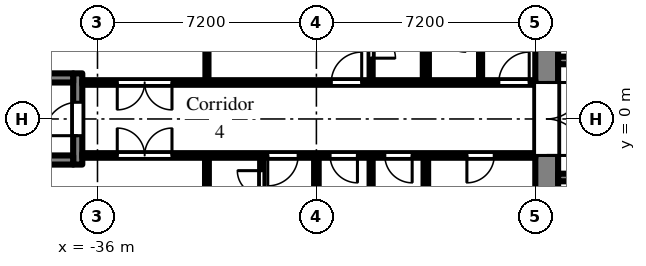
"""IFC4 building model, lengths in metres.
Left out: names, types, materials, properties, quantities, classifications, styles, units other than length and angle.
Written with IfcOpenShell. Run it as: python <this file> out.ifc"""

import sys

from ifc_helpers import new_model, si_unit, direction, frame, frame_2d, origin, place, context, subcontext, project, spatial, rectangle, extrude, element, fill, save


model = new_model("IFC4")
c1 = context("Model", 3, precision=1e-05, world=origin(), true_north=direction((0.0, 1.0)))
c2 = subcontext(c1, "Body", "Model", "MODEL_VIEW")
j1 = project(units=[si_unit("LENGTHUNIT", "METRE"), si_unit("PLANEANGLEUNIT", "RADIAN")], contexts=[c1])
p1 = place(None, origin())
s1 = spatial("IfcSite", under=j1, at=p1, CompositionType="ELEMENT")
p2 = place(p1, origin())
s2 = spatial("IfcBuilding", under=s1, at=p2, CompositionType="ELEMENT")
p3 = place(p2, frame((0.0, 0.0, 66.9)))
s3 = spatial("IfcBuildingStorey", under=s2, at=p3, CompositionType="ELEMENT", Elevation=66.9)
p4 = place(p3, frame((-21.225, -7.2, 0.0), z_axis=(0.0, 0.0, 1.0), x_axis=(0.0, 1.0, 0.0)))
e1 = element("IfcWall", 1, at=p4, inside=s3, PredefinedType="SHEAR", context=c2, shape_type="SweptSolid", body=[
    extrude(rectangle(XDim=14.4, YDim=0.75, at=frame_2d((7.2, 0.0))), origin(), (0.0, 0.0, 1.0), 2.575),
])
p5 = place(p4, frame((6.0, 0.0, 0.0)))
e2 = element("IfcOpeningElement", 2, at=p5, cuts=e1, PredefinedType="OPENING", context=c2, shape_type="SweptSolid", body=[
    extrude(rectangle(XDim=2.4, YDim=2.2, at=frame_2d((1.2, 1.1))), frame((0.0, 0.385, 0.0), z_axis=(0.0, -1.0, 0.0), x_axis=(1.0, 0.0, 0.0)), (0.0, 0.0, 1.0), 0.77),
])
p6 = place(p3, frame((-7.9, 1.925, 0.0), z_axis=(0.0, 0.0, 1.0), x_axis=(-1.0, 0.0, 0.0)))
e3 = element("IfcWall", 3, at=p6, inside=s3, PredefinedType="SHEAR", context=c2, shape_type="SweptSolid", body=[
    extrude(rectangle(XDim=12.95, YDim=0.25, at=frame_2d((6.475, 0.0))), origin(), (0.0, 0.0, 1.0), 2.575),
])
p7 = place(p6, frame((0.525, 0.0, 0.0)))
e4 = element("IfcOpeningElement", 4, at=p7, cuts=e3, PredefinedType="OPENING", context=c2, shape_type="SweptSolid", body=[
    extrude(rectangle(XDim=0.9, YDim=2.1, at=frame_2d((0.45, 1.05))), frame((0.0, 0.135, 0.0), z_axis=(0.0, -1.0, 0.0), x_axis=(1.0, 0.0, 0.0)), (0.0, 0.0, 1.0), 0.27),
])
p8 = place(p6, frame((2.625, 0.0, 0.0)))
e5 = element("IfcOpeningElement", 5, at=p8, cuts=e3, PredefinedType="OPENING", context=c2, shape_type="SweptSolid", body=[
    extrude(rectangle(XDim=1.1, YDim=2.1, at=frame_2d((0.55, 1.05))), frame((0.0, 0.135, 0.0), z_axis=(0.0, -1.0, 0.0), x_axis=(1.0, 0.0, 0.0)), (0.0, 0.0, 1.0), 0.27),
])
p9 = place(p6, frame((7.125, 0.0, 0.0)))
e6 = element("IfcOpeningElement", 6, at=p9, cuts=e3, PredefinedType="OPENING", context=c2, shape_type="SweptSolid", body=[
    extrude(rectangle(XDim=0.9, YDim=2.1, at=frame_2d((0.45, 1.05))), frame((0.0, 0.135, 0.0), z_axis=(0.0, -1.0, 0.0), x_axis=(1.0, 0.0, 0.0)), (0.0, 0.0, 1.0), 0.27),
])
p10 = place(p3, frame((-7.9, -1.925, 0.0), z_axis=(0.0, 0.0, 1.0), x_axis=(-1.0, 0.0, 0.0)))
e7 = element("IfcWall", 7, at=p10, inside=s3, PredefinedType="SHEAR", context=c2, shape_type="SweptSolid", body=[
    extrude(rectangle(XDim=12.95, YDim=0.25, at=frame_2d((6.475, 0.0))), origin(), (0.0, 0.0, 1.0), 2.575),
])
p11 = place(p10, frame((4.825, 0.0, 0.0)))
e8 = element("IfcOpeningElement", 8, at=p11, cuts=e7, PredefinedType="OPENING", context=c2, shape_type="SweptSolid", body=[
    extrude(rectangle(XDim=1.1, YDim=2.1, at=frame_2d((0.55, 1.05))), frame((0.0, 0.135, 0.0), z_axis=(0.0, -1.0, 0.0), x_axis=(1.0, 0.0, 0.0)), (0.0, 0.0, 1.0), 0.27),
])
p12 = place(p10, frame((7.025, 0.0, 0.0)))
e9 = element("IfcOpeningElement", 9, at=p12, cuts=e7, PredefinedType="OPENING", context=c2, shape_type="SweptSolid", body=[
    extrude(rectangle(XDim=1.1, YDim=2.1, at=frame_2d((0.55, 1.05))), frame((0.0, 0.135, 0.0), z_axis=(0.0, -1.0, 0.0), x_axis=(1.0, 0.0, 0.0)), (0.0, 0.0, 1.0), 0.27),
])
p13 = place(p10, frame((9.225, 0.0, 0.0)))
e10 = element("IfcOpeningElement", 10, at=p13, cuts=e7, PredefinedType="OPENING", context=c2, shape_type="SweptSolid", body=[
    extrude(rectangle(XDim=1.1, YDim=2.1, at=frame_2d((0.55, 1.05))), frame((0.0, 0.135, 0.0), z_axis=(0.0, -1.0, 0.0), x_axis=(1.0, 0.0, 0.0)), (0.0, 0.0, 1.0), 0.27),
])
p14 = place(p10, frame((0.525, 0.0, 0.0)))
e11 = element("IfcOpeningElement", 11, at=p14, cuts=e7, PredefinedType="OPENING", context=c2, shape_type="SweptSolid", body=[
    extrude(rectangle(XDim=0.9, YDim=2.1, at=frame_2d((0.45, 1.05))), frame((0.0, 0.135, 0.0), z_axis=(0.0, -1.0, 0.0), x_axis=(1.0, 0.0, 0.0)), (0.0, 0.0, 1.0), 0.27),
])
p15 = place(p10, frame((2.625, 0.0, 0.0)))
e12 = element("IfcOpeningElement", 12, at=p15, cuts=e7, PredefinedType="OPENING", context=c2, shape_type="SweptSolid", body=[
    extrude(rectangle(XDim=1.1, YDim=2.1, at=frame_2d((0.55, 1.05))), frame((0.0, 0.135, 0.0), z_axis=(0.0, -1.0, 0.0), x_axis=(1.0, 0.0, 0.0)), (0.0, 0.0, 1.0), 0.27),
])
p16 = place(p3, frame((-36.65, -1.5, 0.0), z_axis=(0.0, 0.0, 1.0), x_axis=(0.0, 1.0, 0.0)))
e13 = element("IfcWall", 13, at=p16, inside=s3, PredefinedType="SHEAR", context=c2, shape_type="SweptSolid", body=[
    extrude(rectangle(XDim=3.0, YDim=0.3, at=frame_2d((1.5, 0.0))), origin(), (0.0, 0.0, 1.0), 2.575),
])
p17 = place(p16, frame((0.95, 0.0, 0.0)))
e14 = element("IfcOpeningElement", 14, at=p17, cuts=e13, PredefinedType="OPENING", context=c2, shape_type="SweptSolid", body=[
    extrude(rectangle(XDim=1.1, YDim=2.1, at=frame_2d((0.55, 1.05))), frame((0.0, 0.16, 0.0), z_axis=(0.0, -1.0, 0.0), x_axis=(1.0, 0.0, 0.0)), (0.0, 0.0, 1.0), 0.32),
])
for number, where, z_axis, x_axis in (
    (15, (-36.8, -1.35, 0.0), (0.0, 0.0, 1.0), (-1.0, 0.0, 0.0)),
    (16, (-36.8, 1.35, 0.0), (0.0, 0.0, 1.0), (-1.0, 0.0, 0.0)),
):
    element("IfcWall", number, at=place(p3, frame(where, z_axis=z_axis, x_axis=x_axis)), inside=s3, PredefinedType="SHEAR", context=c2, shape_type="SweptSolid", body=[
        extrude(rectangle(XDim=5.8, YDim=0.3, at=frame_2d((2.9, 0.0))), origin(), (0.0, 0.0, 1.0), 2.575),
    ])
p18 = place(p3, frame((-36.5, -1.2, 0.0), z_axis=(0.0, 0.0, 1.0), x_axis=(1.0, 0.0, 0.0)))
e17 = element("IfcWall", 17, at=p18, inside=s3, PredefinedType="PARTITIONING", context=c2, shape_type="SweptSolid", body=[
    extrude(rectangle(XDim=14.9, YDim=0.15, at=frame_2d((7.45, 0.0))), origin(), (0.0, 0.0, 1.0), 2.575),
])
p19 = place(p18, frame((12.65, 0.0, 0.0)))
e18 = element("IfcOpeningElement", 18, at=p19, cuts=e17, PredefinedType="OPENING", context=c2, shape_type="SweptSolid", body=[
    extrude(rectangle(XDim=0.9, YDim=2.1, at=frame_2d((0.45, 1.05))), frame((0.0, 0.085, 0.0), z_axis=(0.0, -1.0, 0.0), x_axis=(1.0, 0.0, 0.0)), (0.0, 0.0, 1.0), 0.17),
])
p20 = place(p18, frame((9.95, 0.0, 0.0)))
e19 = element("IfcOpeningElement", 19, at=p20, cuts=e17, PredefinedType="OPENING", context=c2, shape_type="SweptSolid", body=[
    extrude(rectangle(XDim=0.9, YDim=2.1, at=frame_2d((0.45, 1.05))), frame((0.0, 0.085, 0.0), z_axis=(0.0, -1.0, 0.0), x_axis=(1.0, 0.0, 0.0)), (0.0, 0.0, 1.0), 0.17),
])
p21 = place(p18, frame((8.15, 0.0, 0.0)))
e20 = element("IfcOpeningElement", 20, at=p21, cuts=e17, PredefinedType="OPENING", context=c2, shape_type="SweptSolid", body=[
    extrude(rectangle(XDim=0.9, YDim=2.1, at=frame_2d((0.45, 1.05))), frame((0.0, 0.085, 0.0), z_axis=(0.0, -1.0, 0.0), x_axis=(1.0, 0.0, 0.0)), (0.0, 0.0, 1.0), 0.17),
])
p22 = place(p18, frame((6.1, 0.0, 0.0)))
e21 = element("IfcOpeningElement", 21, at=p22, cuts=e17, PredefinedType="OPENING", context=c2, shape_type="SweptSolid", body=[
    extrude(rectangle(XDim=1.0, YDim=2.1, at=frame_2d((0.5, 1.05))), frame((0.0, 0.085, 0.0), z_axis=(0.0, -1.0, 0.0), x_axis=(1.0, 0.0, 0.0)), (0.0, 0.0, 1.0), 0.17),
])
p23 = place(p18, frame((1.15, 0.0, 0.0)))
e22 = element("IfcOpeningElement", 22, at=p23, cuts=e17, PredefinedType="OPENING", context=c2, shape_type="SweptSolid", body=[
    extrude(rectangle(XDim=1.8, YDim=2.1, at=frame_2d((0.9, 1.05))), frame((0.0, 0.085, 0.0), z_axis=(0.0, -1.0, 0.0), x_axis=(1.0, 0.0, 0.0)), (0.0, 0.0, 1.0), 0.17),
])
p24 = place(p3, frame((-36.5, 1.2, 0.0), z_axis=(0.0, 0.0, 1.0), x_axis=(1.0, 0.0, 0.0)))
e23 = element("IfcWall", 23, at=p24, inside=s3, PredefinedType="PARTITIONING", context=c2, shape_type="SweptSolid", body=[
    extrude(rectangle(XDim=14.9, YDim=0.15, at=frame_2d((7.45, 0.0))), origin(), (0.0, 0.0, 1.0), 2.575),
])
p25 = place(p24, frame((13.7, 0.0, 0.0)))
e24 = element("IfcOpeningElement", 24, at=p25, cuts=e23, PredefinedType="OPENING", context=c2, shape_type="SweptSolid", body=[
    extrude(rectangle(XDim=1.0, YDim=2.1, at=frame_2d((0.5, 1.05))), frame((0.0, 0.085, 0.0), z_axis=(0.0, -1.0, 0.0), x_axis=(1.0, 0.0, 0.0)), (0.0, 0.0, 1.0), 0.17),
])
p26 = place(p24, frame((8.19, 0.0, 0.0)))
e25 = element("IfcOpeningElement", 25, at=p26, cuts=e23, PredefinedType="OPENING", context=c2, shape_type="SweptSolid", body=[
    extrude(rectangle(XDim=1.0, YDim=2.1, at=frame_2d((0.5, 1.05))), frame((0.0, 0.085, 0.0), z_axis=(0.0, -1.0, 0.0), x_axis=(1.0, 0.0, 0.0)), (0.0, 0.0, 1.0), 0.17),
])
p27 = place(p24, frame((1.15, 0.0, 0.0)))
e26 = element("IfcOpeningElement", 26, at=p27, cuts=e23, PredefinedType="OPENING", context=c2, shape_type="SweptSolid", body=[
    extrude(rectangle(XDim=1.8, YDim=2.1, at=frame_2d((0.9, 1.05))), frame((0.0, 0.085, 0.0), z_axis=(0.0, -1.0, 0.0), x_axis=(1.0, 0.0, 0.0)), (0.0, 0.0, 1.0), 0.17),
])
p28 = place(p3, frame((-32.4, -3.0, 0.0), z_axis=(0.0, 0.0, 1.0), x_axis=(0.0, 1.0, 0.0)))
e27 = element("IfcWall", 27, at=p28, inside=s3, PredefinedType="PARTITIONING", context=c2, shape_type="SweptSolid", body=[
    extrude(rectangle(XDim=1.725, YDim=0.125, at=frame_2d((0.863, 0.0))), origin(), (0.0, 0.0, 1.0), 2.575),
])
p29 = place(p3, frame((-32.4, 1.275, 0.0), z_axis=(0.0, 0.0, 1.0), x_axis=(0.0, 1.0, 0.0)))
e28 = element("IfcWall", 28, at=p29, inside=s3, PredefinedType="PARTITIONING", context=c2, shape_type="SweptSolid", body=[
    extrude(rectangle(XDim=5.625, YDim=0.1, at=frame_2d((2.812, 0.0))), origin(), (0.0, 0.0, 1.0), 2.575),
])
p30 = place(p3, frame((-30.6, -2.95, 0.0), z_axis=(0.0, 0.0, 1.0), x_axis=(0.0, 1.0, 0.0)))
e29 = element("IfcWall", 29, at=p30, inside=s3, PredefinedType="PARTITIONING", context=c2, shape_type="SweptSolid", body=[
    extrude(rectangle(XDim=1.675, YDim=0.1, at=frame_2d((0.837, 0.0))), origin(), (0.0, 0.0, 1.0), 2.575),
])
p31 = place(p30, frame((0.45, 0.0, 0.0)))
e30 = element("IfcOpeningElement", 30, at=p31, cuts=e29, PredefinedType="OPENING", context=c2, shape_type="SweptSolid", body=[
    extrude(rectangle(XDim=0.8, YDim=2.1, at=frame_2d((0.4, 1.05))), frame((0.0, 0.06, 0.0), z_axis=(0.0, -1.0, 0.0), x_axis=(1.0, 0.0, 0.0)), (0.0, 0.0, 1.0), 0.12),
])
p32 = place(p3, frame((-28.8, -6.9, 0.0), z_axis=(0.0, 0.0, 1.0), x_axis=(0.0, 1.0, 0.0)))
e31 = element("IfcWall", 31, at=p32, inside=s3, PredefinedType="PARTITIONING", context=c2, shape_type="SweptSolid", body=[
    extrude(rectangle(XDim=5.625, YDim=0.15, at=frame_2d((2.812, 0.0))), origin(), (0.0, 0.0, 1.0), 2.575),
])
p33 = place(p3, frame((-27.0, -6.9, 0.0), z_axis=(0.0, 0.0, 1.0), x_axis=(0.0, 1.0, 0.0)))
e32 = element("IfcWall", 32, at=p33, inside=s3, PredefinedType="PARTITIONING", context=c2, shape_type="SweptSolid", body=[
    extrude(rectangle(XDim=5.625, YDim=0.1, at=frame_2d((2.812, 0.0))), origin(), (0.0, 0.0, 1.0), 2.575),
])
p34 = place(p3, frame((-27.0, 1.275, 0.0), z_axis=(0.0, 0.0, 1.0), x_axis=(0.0, 1.0, 0.0)))
e33 = element("IfcWall", 33, at=p34, inside=s3, PredefinedType="PARTITIONING", context=c2, shape_type="SweptSolid", body=[
    extrude(rectangle(XDim=2.375, YDim=0.1, at=frame_2d((1.188, 0.0))), origin(), (0.0, 0.0, 1.0), 2.575),
])
p35 = place(p34, frame((0.725, 0.0, 0.0)))
e34 = element("IfcOpeningElement", 34, at=p35, cuts=e33, PredefinedType="OPENING", context=c2, shape_type="SweptSolid", body=[
    extrude(rectangle(XDim=0.8, YDim=2.1, at=frame_2d((0.4, 1.05))), frame((0.0, 0.06, 0.0), z_axis=(0.0, -1.0, 0.0), x_axis=(1.0, 0.0, 0.0)), (0.0, 0.0, 1.0), 0.12),
])
p36 = place(p3, frame((-25.2, -6.9, 0.0), z_axis=(0.0, 0.0, 1.0), x_axis=(0.0, 1.0, 0.0)))
e35 = element("IfcWall", 35, at=p36, inside=s3, PredefinedType="PARTITIONING", context=c2, shape_type="SweptSolid", body=[
    extrude(rectangle(XDim=5.625, YDim=0.15, at=frame_2d((2.812, 0.0))), origin(), (0.0, 0.0, 1.0), 2.575),
])
p37 = place(p3, frame((-25.2, 1.275, 0.0), z_axis=(0.0, 0.0, 1.0), x_axis=(0.0, 1.0, 0.0)))
e36 = element("IfcWall", 36, at=p37, inside=s3, PredefinedType="PARTITIONING", context=c2, shape_type="SweptSolid", body=[
    extrude(rectangle(XDim=5.625, YDim=0.2, at=frame_2d((2.812, 0.0))), origin(), (0.0, 0.0, 1.0), 2.575),
])
p38 = place(p3, frame((-23.4, 1.275, 0.0), z_axis=(0.0, 0.0, 1.0), x_axis=(0.0, 1.0, 0.0)))
e37 = element("IfcWall", 37, at=p38, inside=s3, PredefinedType="PARTITIONING", context=c2, shape_type="SweptSolid", body=[
    extrude(rectangle(XDim=1.675, YDim=0.1, at=frame_2d((0.837, 0.0))), origin(), (0.0, 0.0, 1.0), 2.575),
])
p39 = place(p5, frame((2.4, 0.0, 0.0), z_axis=(0.0, 0.0, 1.0), x_axis=(-1.0, 0.0, 0.0)))
e38 = element("IfcDoor", 38, at=p39, inside=s3, OperationType="DOUBLE_DOOR_DOUBLE_SWING", PredefinedType="DOOR", context=c2, shape_type="SweptSolid", body=[
    extrude(rectangle(XDim=2.4, YDim=2.2, at=frame_2d((1.2, 1.1))), frame((0.0, 0.025, 0.0), z_axis=(0.0, -1.0, 0.0), x_axis=(1.0, 0.0, 0.0)), (0.0, 0.0, 1.0), 0.05),
])
fill(e2, e38)
p40 = place(p17, origin())
e39 = element("IfcDoor", 39, at=p40, inside=s3, OperationType="SINGLE_SWING_LEFT", PredefinedType="DOOR", context=c2, shape_type="SweptSolid", body=[
    extrude(rectangle(XDim=1.1, YDim=2.1, at=frame_2d((0.55, 1.05))), frame((0.0, 0.025, 0.0), z_axis=(0.0, -1.0, 0.0), x_axis=(1.0, 0.0, 0.0)), (0.0, 0.0, 1.0), 0.05),
])
fill(e14, e39)
p41 = place(p19, frame((0.9, 0.0, 0.0), z_axis=(0.0, 0.0, 1.0), x_axis=(-1.0, 0.0, 0.0)))
e40 = element("IfcDoor", 40, at=p41, inside=s3, OperationType="SINGLE_SWING_RIGHT", PredefinedType="DOOR", context=c2, shape_type="SweptSolid", body=[
    extrude(rectangle(XDim=0.9, YDim=2.1, at=frame_2d((0.45, 1.05))), frame((0.0, 0.025, 0.0), z_axis=(0.0, -1.0, 0.0), x_axis=(1.0, 0.0, 0.0)), (0.0, 0.0, 1.0), 0.05),
])
fill(e18, e40)
p42 = place(p20, frame((0.9, 0.0, 0.0), z_axis=(0.0, 0.0, 1.0), x_axis=(-1.0, 0.0, 0.0)))
e41 = element("IfcDoor", 41, at=p42, inside=s3, OperationType="SINGLE_SWING_LEFT", PredefinedType="DOOR", context=c2, shape_type="SweptSolid", body=[
    extrude(rectangle(XDim=0.9, YDim=2.1, at=frame_2d((0.45, 1.05))), frame((0.0, 0.025, 0.0), z_axis=(0.0, -1.0, 0.0), x_axis=(1.0, 0.0, 0.0)), (0.0, 0.0, 1.0), 0.05),
])
fill(e19, e41)
p43 = place(p21, frame((0.9, 0.0, 0.0), z_axis=(0.0, 0.0, 1.0), x_axis=(-1.0, 0.0, 0.0)))
e42 = element("IfcDoor", 42, at=p43, inside=s3, OperationType="SINGLE_SWING_LEFT", PredefinedType="DOOR", context=c2, shape_type="SweptSolid", body=[
    extrude(rectangle(XDim=0.9, YDim=2.1, at=frame_2d((0.45, 1.05))), frame((0.0, 0.025, 0.0), z_axis=(0.0, -1.0, 0.0), x_axis=(1.0, 0.0, 0.0)), (0.0, 0.0, 1.0), 0.05),
])
fill(e20, e42)
p44 = place(p31, origin())
e43 = element("IfcDoor", 43, at=p44, inside=s3, OperationType="SINGLE_SWING_RIGHT", PredefinedType="DOOR", context=c2, shape_type="SweptSolid", body=[
    extrude(rectangle(XDim=0.8, YDim=2.1, at=frame_2d((0.4, 1.05))), frame((0.0, 0.025, 0.0), z_axis=(0.0, -1.0, 0.0), x_axis=(1.0, 0.0, 0.0)), (0.0, 0.0, 1.0), 0.05),
])
fill(e30, e43)
p45 = place(p22, frame((1.0, 0.0, 0.0), z_axis=(0.0, 0.0, 1.0), x_axis=(-1.0, 0.0, 0.0)))
e44 = element("IfcDoor", 44, at=p45, inside=s3, OperationType="SINGLE_SWING_RIGHT", PredefinedType="DOOR", context=c2, shape_type="SweptSolid", body=[
    extrude(rectangle(XDim=1.0, YDim=2.1, at=frame_2d((0.5, 1.05))), frame((0.0, 0.025, 0.0), z_axis=(0.0, -1.0, 0.0), x_axis=(1.0, 0.0, 0.0)), (0.0, 0.0, 1.0), 0.05),
])
fill(e21, e44)
p46 = place(p23, origin())
e45 = element("IfcDoor", 45, at=p46, inside=s3, OperationType="DOUBLE_DOOR_DOUBLE_SWING", PredefinedType="DOOR", context=c2, shape_type="SweptSolid", body=[
    extrude(rectangle(XDim=1.8, YDim=2.1, at=frame_2d((0.9, 1.05))), frame((0.0, 0.025, 0.0), z_axis=(0.0, -1.0, 0.0), x_axis=(1.0, 0.0, 0.0)), (0.0, 0.0, 1.0), 0.05),
])
fill(e22, e45)
p47 = place(p25, origin())
e46 = element("IfcDoor", 46, at=p47, inside=s3, OperationType="SINGLE_SWING_RIGHT", PredefinedType="DOOR", context=c2, shape_type="SweptSolid", body=[
    extrude(rectangle(XDim=1.0, YDim=2.1, at=frame_2d((0.5, 1.05))), frame((0.0, 0.025, 0.0), z_axis=(0.0, -1.0, 0.0), x_axis=(1.0, 0.0, 0.0)), (0.0, 0.0, 1.0), 0.05),
])
fill(e24, e46)
p48 = place(p35, frame((0.8, 0.0, 0.0), z_axis=(0.0, 0.0, 1.0), x_axis=(-1.0, 0.0, 0.0)))
e47 = element("IfcDoor", 47, at=p48, inside=s3, OperationType="SINGLE_SWING_RIGHT", PredefinedType="DOOR", context=c2, shape_type="SweptSolid", body=[
    extrude(rectangle(XDim=0.8, YDim=2.1, at=frame_2d((0.4, 1.05))), frame((0.0, 0.025, 0.0), z_axis=(0.0, -1.0, 0.0), x_axis=(1.0, 0.0, 0.0)), (0.0, 0.0, 1.0), 0.05),
])
fill(e34, e47)
p49 = place(p26, origin())
e48 = element("IfcDoor", 48, at=p49, inside=s3, OperationType="SINGLE_SWING_RIGHT", PredefinedType="DOOR", context=c2, shape_type="SweptSolid", body=[
    extrude(rectangle(XDim=1.0, YDim=2.1, at=frame_2d((0.5, 1.05))), frame((0.0, 0.025, 0.0), z_axis=(0.0, -1.0, 0.0), x_axis=(1.0, 0.0, 0.0)), (0.0, 0.0, 1.0), 0.05),
])
fill(e25, e48)
p50 = place(p27, frame((1.8, 0.0, 0.0), z_axis=(0.0, 0.0, 1.0), x_axis=(-1.0, 0.0, 0.0)))
e49 = element("IfcDoor", 49, at=p50, inside=s3, OperationType="DOUBLE_DOOR_DOUBLE_SWING", PredefinedType="DOOR", context=c2, shape_type="SweptSolid", body=[
    extrude(rectangle(XDim=1.8, YDim=2.1, at=frame_2d((0.9, 1.05))), frame((0.0, 0.025, 0.0), z_axis=(0.0, -1.0, 0.0), x_axis=(1.0, 0.0, 0.0)), (0.0, 0.0, 1.0), 0.05),
])
fill(e26, e49)
save(model, sys.argv[1])
